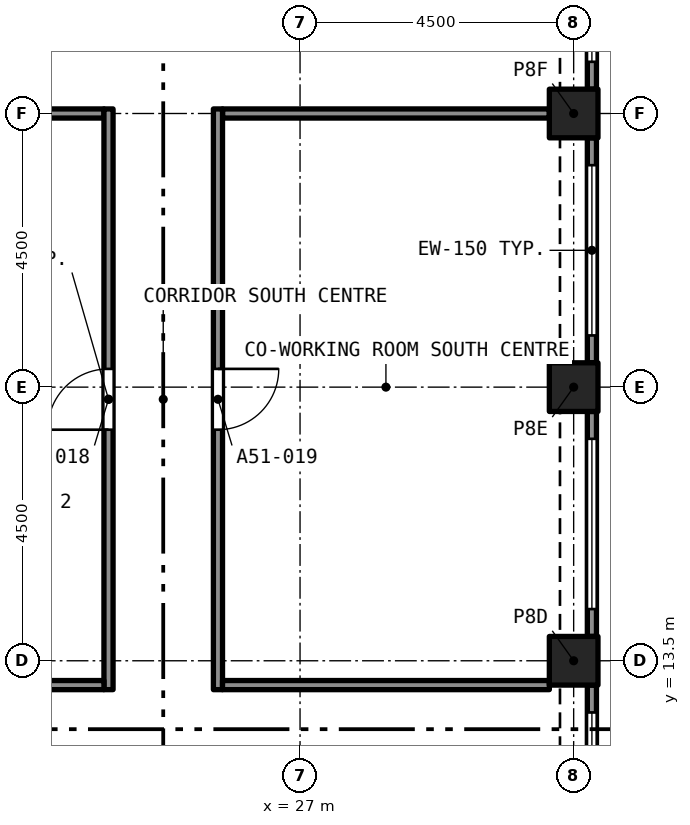
"""IFC4 building model, lengths in metres.
Left out: names, types, materials, properties, quantities, classifications, styles, units other than length and angle.
Written with IfcOpenShell. Run it as: python <this file> out.ifc"""

import sys

from ifc_helpers import new_model, si_unit, direction, frame, frame_2d, origin, origin_2d, place, context, subcontext, project, spatial, rectangle, extrude, element, fill, save


model = new_model("IFC4")
c1 = context("Model", 3, precision=1e-05, world=origin(), true_north=direction((0.0, 1.0)))
c2 = subcontext(c1, "Body", "Model", "MODEL_VIEW")
j1 = project(units=[si_unit("LENGTHUNIT", "METRE"), si_unit("PLANEANGLEUNIT", "RADIAN")], contexts=[c1])
p1 = place(None, origin())
s1 = spatial("IfcSite", under=j1, at=p1, CompositionType="ELEMENT")
p2 = place(p1, origin())
s2 = spatial("IfcBuilding", under=s1, at=p2, CompositionType="ELEMENT")
p3 = place(p2, frame((0.0, 0.0, 185.9)))
s3 = spatial("IfcBuildingStorey", under=s2, at=p3, CompositionType="ELEMENT", Elevation=185.9)
for number, where, z_axis, x_axis in (
    (1, (31.5, 13.5, 0.0), (0.0, 0.0, 1.0), (1.0, 0.0, 0.0)),
    (2, (31.5, 18.0, 0.0), (0.0, 0.0, 1.0), (1.0, 0.0, 0.0)),
    (3, (31.5, 22.5, 0.0), (0.0, 0.0, 1.0), (1.0, 0.0, 0.0)),
):
    element("IfcColumn", number, at=place(p3, frame(where, z_axis=z_axis, x_axis=x_axis)), inside=s3, PredefinedType="COLUMN", context=c2, shape_type="SweptSolid", body=[
        extrude(rectangle(XDim=0.8, YDim=0.8, at=origin_2d()), origin(), (0.0, 0.0, 1.0), 3.2),
    ])
p4 = place(p3, frame((31.8, 13.1, 0.0), z_axis=(0.0, 0.0, 1.0), x_axis=(0.0, -1.0, 0.0)))
e4 = element("IfcWall", 4, at=p4, inside=s3, PredefinedType="SOLIDWALL", context=c2, shape_type="SweptSolid", body=[
    extrude(rectangle(XDim=3.7, YDim=0.15, at=frame_2d((1.85, 0.0))), origin(), (0.0, 0.0, 1.0), 3.2),
])
p5 = place(p4, frame((0.45, 0.0, 0.45)))
e5 = element("IfcOpeningElement", 5, at=p5, cuts=e4, PredefinedType="OPENING", context=c2, shape_type="SweptSolid", body=[
    extrude(rectangle(XDim=2.8, YDim=1.95, at=frame_2d((1.4, 0.975))), frame((0.0, 0.085, 0.0), z_axis=(0.0, -1.0, 0.0), x_axis=(1.0, 0.0, 0.0)), (0.0, 0.0, 1.0), 0.17),
])
p6 = place(p3, frame((31.8, 17.6, 0.0), z_axis=(0.0, 0.0, 1.0), x_axis=(0.0, -1.0, 0.0)))
e6 = element("IfcWall", 6, at=p6, inside=s3, PredefinedType="SOLIDWALL", context=c2, shape_type="SweptSolid", body=[
    extrude(rectangle(XDim=3.7, YDim=0.15, at=frame_2d((1.85, 0.0))), origin(), (0.0, 0.0, 1.0), 3.2),
])
p7 = place(p6, frame((0.45, 0.0, 0.45)))
e7 = element("IfcOpeningElement", 7, at=p7, cuts=e6, PredefinedType="OPENING", context=c2, shape_type="SweptSolid", body=[
    extrude(rectangle(XDim=2.8, YDim=1.95, at=frame_2d((1.4, 0.975))), frame((0.0, 0.085, 0.0), z_axis=(0.0, -1.0, 0.0), x_axis=(1.0, 0.0, 0.0)), (0.0, 0.0, 1.0), 0.17),
])
p8 = place(p3, frame((31.8, 22.1, 0.0), z_axis=(0.0, 0.0, 1.0), x_axis=(0.0, -1.0, 0.0)))
e8 = element("IfcWall", 8, at=p8, inside=s3, PredefinedType="SOLIDWALL", context=c2, shape_type="SweptSolid", body=[
    extrude(rectangle(XDim=3.7, YDim=0.15, at=frame_2d((1.85, 0.0))), origin(), (0.0, 0.0, 1.0), 3.2),
])
p9 = place(p8, frame((0.45, 0.0, 0.45)))
e9 = element("IfcOpeningElement", 9, at=p9, cuts=e8, PredefinedType="OPENING", context=c2, shape_type="SweptSolid", body=[
    extrude(rectangle(XDim=2.8, YDim=1.95, at=frame_2d((1.4, 0.975))), frame((0.0, 0.085, 0.0), z_axis=(0.0, -1.0, 0.0), x_axis=(1.0, 0.0, 0.0)), (0.0, 0.0, 1.0), 0.17),
])
p10 = place(p3, frame((31.8, 26.6, 0.0), z_axis=(0.0, 0.0, 1.0), x_axis=(0.0, -1.0, 0.0)))
e10 = element("IfcWall", 10, at=p10, inside=s3, PredefinedType="SOLIDWALL", context=c2, shape_type="SweptSolid", body=[
    extrude(rectangle(XDim=3.7, YDim=0.15, at=frame_2d((1.85, 0.0))), origin(), (0.0, 0.0, 1.0), 3.2),
])
p11 = place(p10, frame((0.45, 0.0, 0.45)))
e11 = element("IfcOpeningElement", 11, at=p11, cuts=e10, PredefinedType="OPENING", context=c2, shape_type="SweptSolid", body=[
    extrude(rectangle(XDim=2.8, YDim=1.95, at=frame_2d((1.4, 0.975))), frame((0.0, 0.085, 0.0), z_axis=(0.0, -1.0, 0.0), x_axis=(1.0, 0.0, 0.0)), (0.0, 0.0, 1.0), 0.17),
])
for number, where, z_axis, x_axis in (
    (12, (18.4, 22.5, 0.0), (0.0, 0.0, 1.0), (1.0, 0.0, 0.0)),
    (13, (25.725, 22.5, 0.0), (0.0, 0.0, 1.0), (1.0, 0.0, 0.0)),
):
    element("IfcWall", number, at=place(p3, frame(where, z_axis=z_axis, x_axis=x_axis)), inside=s3, PredefinedType="PARTITIONING", context=c2, shape_type="SweptSolid", body=[
        extrude(rectangle(XDim=5.375, YDim=0.15, at=frame_2d((2.688, 0.0))), origin(), (0.0, 0.0, 1.0), 2.75),
    ])
p12 = place(p3, frame((23.85, 13.025, 0.0), z_axis=(0.0, 0.0, 1.0), x_axis=(0.0, 1.0, 0.0)))
e14 = element("IfcWall", 14, at=p12, inside=s3, PredefinedType="PARTITIONING", context=c2, shape_type="SweptSolid", body=[
    extrude(rectangle(XDim=9.55, YDim=0.15, at=frame_2d((4.775, 0.0))), origin(), (0.0, 0.0, 1.0), 2.75),
])
p13 = place(p12, frame((4.275, 0.0, 0.0)))
e15 = element("IfcOpeningElement", 15, at=p13, cuts=e14, PredefinedType="OPENING", context=c2, shape_type="SweptSolid", body=[
    extrude(rectangle(XDim=1.0, YDim=2.1, at=frame_2d((0.5, 1.05))), frame((0.0, 0.085, 0.0), z_axis=(0.0, -1.0, 0.0), x_axis=(1.0, 0.0, 0.0)), (0.0, 0.0, 1.0), 0.17),
])
p14 = place(p3, frame((25.65, 22.575, 0.0), z_axis=(0.0, 0.0, 1.0), x_axis=(0.0, -1.0, 0.0)))
e16 = element("IfcWall", 16, at=p14, inside=s3, PredefinedType="PARTITIONING", context=c2, shape_type="SweptSolid", body=[
    extrude(rectangle(XDim=9.55, YDim=0.15, at=frame_2d((4.775, 0.0))), origin(), (0.0, 0.0, 1.0), 2.75),
])
p15 = place(p14, frame((4.275, 0.0, 0.0)))
e17 = element("IfcOpeningElement", 17, at=p15, cuts=e16, PredefinedType="OPENING", context=c2, shape_type="SweptSolid", body=[
    extrude(rectangle(XDim=1.0, YDim=2.1, at=frame_2d((0.5, 1.05))), frame((0.0, 0.085, 0.0), z_axis=(0.0, -1.0, 0.0), x_axis=(1.0, 0.0, 0.0)), (0.0, 0.0, 1.0), 0.17),
])
for number, where, z_axis, x_axis in (
    (18, (18.4, 13.1, 0.0), (0.0, 0.0, 1.0), (1.0, 0.0, 0.0)),
    (19, (25.725, 13.1, 0.0), (0.0, 0.0, 1.0), (1.0, 0.0, 0.0)),
):
    element("IfcWall", number, at=place(p3, frame(where, z_axis=z_axis, x_axis=x_axis)), inside=s3, PredefinedType="PARTITIONING", context=c2, shape_type="SweptSolid", body=[
        extrude(rectangle(XDim=5.375, YDim=0.15, at=frame_2d((2.688, 0.0))), origin(), (0.0, 0.0, 1.0), 2.75),
    ])
p16 = place(p5, origin())
e20 = element("IfcWindow", 20, at=p16, inside=s3, PartitioningType="SINGLE_PANEL", PredefinedType="WINDOW", context=c2, shape_type="SweptSolid", body=[
    extrude(rectangle(XDim=2.8, YDim=1.95, at=frame_2d((1.4, 0.975))), frame((0.0, 0.03, 0.0), z_axis=(0.0, -1.0, 0.0), x_axis=(1.0, 0.0, 0.0)), (0.0, 0.0, 1.0), 0.06),
])
fill(e5, e20)
p17 = place(p7, origin())
e21 = element("IfcWindow", 21, at=p17, inside=s3, PartitioningType="SINGLE_PANEL", PredefinedType="WINDOW", context=c2, shape_type="SweptSolid", body=[
    extrude(rectangle(XDim=2.8, YDim=1.95, at=frame_2d((1.4, 0.975))), frame((0.0, 0.03, 0.0), z_axis=(0.0, -1.0, 0.0), x_axis=(1.0, 0.0, 0.0)), (0.0, 0.0, 1.0), 0.06),
])
fill(e7, e21)
p18 = place(p9, origin())
e22 = element("IfcWindow", 22, at=p18, inside=s3, PartitioningType="SINGLE_PANEL", PredefinedType="WINDOW", context=c2, shape_type="SweptSolid", body=[
    extrude(rectangle(XDim=2.8, YDim=1.95, at=frame_2d((1.4, 0.975))), frame((0.0, 0.03, 0.0), z_axis=(0.0, -1.0, 0.0), x_axis=(1.0, 0.0, 0.0)), (0.0, 0.0, 1.0), 0.06),
])
fill(e9, e22)
p19 = place(p11, origin())
e23 = element("IfcWindow", 23, at=p19, inside=s3, PartitioningType="SINGLE_PANEL", PredefinedType="WINDOW", context=c2, shape_type="SweptSolid", body=[
    extrude(rectangle(XDim=2.8, YDim=1.95, at=frame_2d((1.4, 0.975))), frame((0.0, 0.03, 0.0), z_axis=(0.0, -1.0, 0.0), x_axis=(1.0, 0.0, 0.0)), (0.0, 0.0, 1.0), 0.06),
])
fill(e11, e23)
p20 = place(p13, origin())
e24 = element("IfcDoor", 24, at=p20, inside=s3, OperationType="SINGLE_SWING_RIGHT", PredefinedType="DOOR", context=c2, shape_type="SweptSolid", body=[
    extrude(rectangle(XDim=1.0, YDim=2.1, at=frame_2d((0.5, 1.05))), frame((0.0, 0.025, 0.0), z_axis=(0.0, -1.0, 0.0), x_axis=(1.0, 0.0, 0.0)), (0.0, 0.0, 1.0), 0.05),
])
fill(e15, e24)
p21 = place(p15, origin())
e25 = element("IfcDoor", 25, at=p21, inside=s3, OperationType="SINGLE_SWING_LEFT", PredefinedType="DOOR", context=c2, shape_type="SweptSolid", body=[
    extrude(rectangle(XDim=1.0, YDim=2.1, at=frame_2d((0.5, 1.05))), frame((0.0, 0.025, 0.0), z_axis=(0.0, -1.0, 0.0), x_axis=(1.0, 0.0, 0.0)), (0.0, 0.0, 1.0), 0.05),
])
fill(e17, e25)
save(model, sys.argv[1])
